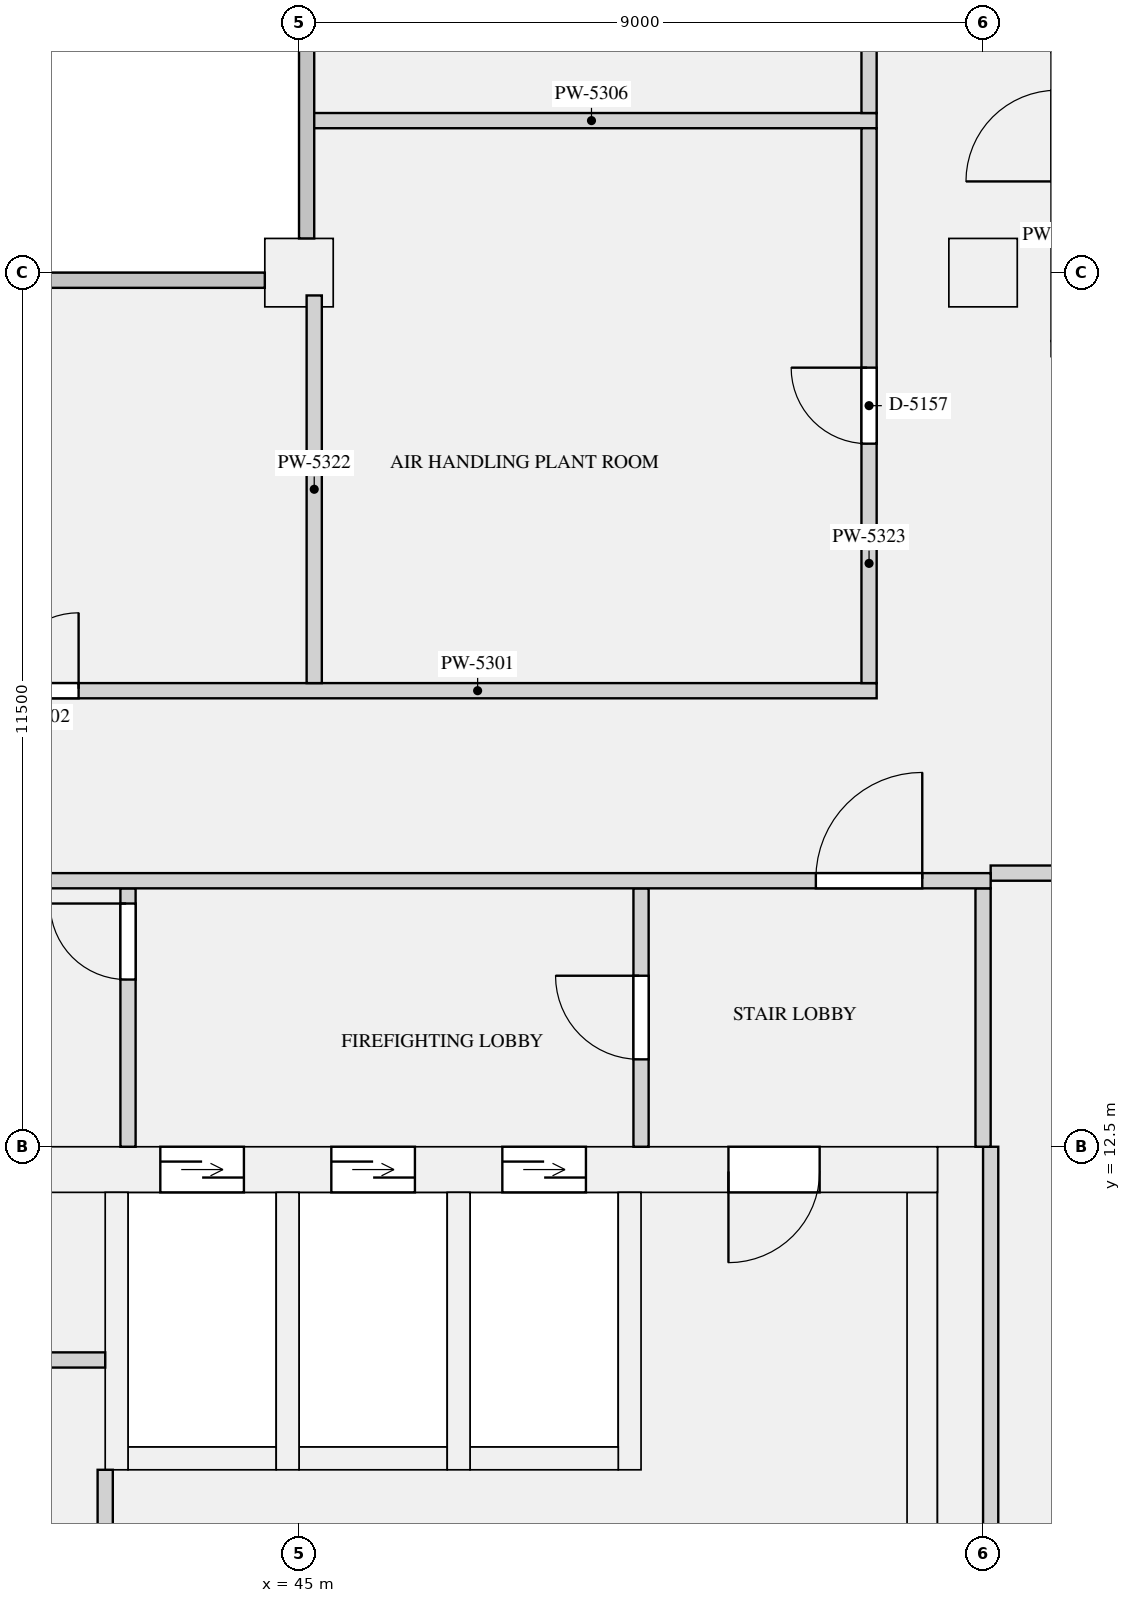
"""IFC4 building model, lengths in metres.
Left out: names, types, materials, properties, quantities, classifications, styles, units other than length and angle.
Written with IfcOpenShell. Run it as: python <this file> out.ifc"""

import sys

from ifc_helpers import new_model, si_unit, direction, frame, frame_2d, origin, origin_2d, place, context, subcontext, project, spatial, rectangle, extrude, element, fill, save


model = new_model("IFC4")
c1 = context("Model", 3, precision=1e-05, world=origin(), true_north=direction((0.0, 1.0)))
c2 = subcontext(c1, "Body", "Model", "MODEL_VIEW")
j1 = project(units=[si_unit("LENGTHUNIT", "METRE"), si_unit("PLANEANGLEUNIT", "RADIAN")], contexts=[c1])
p1 = place(None, origin())
s1 = spatial("IfcSite", under=j1, at=p1, CompositionType="ELEMENT")
p2 = place(p1, origin())
s2 = spatial("IfcBuilding", under=s1, at=p2, CompositionType="ELEMENT")
p3 = place(p2, frame((0.0, 0.0, 240.0)))
s3 = spatial("IfcBuildingStorey", under=s2, at=p3, CompositionType="ELEMENT", Elevation=240.0)
for number, where, z_axis, x_axis in (
    (1, (45.0, 24.0, 0.0), (0.0, 0.0, 1.0), (1.0, 0.0, 0.0)),
    (2, (54.0, 24.0, 0.0), (0.0, 0.0, 1.0), (1.0, 0.0, 0.0)),
):
    element("IfcColumn", number, at=place(p3, frame(where, z_axis=z_axis, x_axis=x_axis)), inside=s3, PredefinedType="COLUMN", context=c2, shape_type="SweptSolid", body=[
        extrude(rectangle(XDim=0.9, YDim=0.9, at=origin_2d()), origin(), (0.0, 0.0, 1.0), 4.2),
    ])
p4 = place(p3, frame((53.7, 0.0, 0.0), z_axis=(0.0, 0.0, 1.0), x_axis=(0.0, 1.0, 0.0)))
e3 = element("IfcWall", 3, at=p4, inside=s3, PredefinedType="SHEAR", context=c2, shape_type="SweptSolid", body=[
    extrude(rectangle(XDim=12.5, YDim=0.6, at=frame_2d((6.25, 0.0))), origin(), (0.0, 0.0, 1.0), 4.2),
])
p5 = place(p3, frame((18.6, 12.2, 0.0), z_axis=(0.0, 0.0, 1.0), x_axis=(1.0, 0.0, 0.0)))
e4 = element("IfcWall", 4, at=p5, inside=s3, PredefinedType="SHEAR", context=c2, shape_type="SweptSolid", body=[
    extrude(rectangle(XDim=34.8, YDim=0.6, at=frame_2d((17.4, 0.0))), origin(), (0.0, 0.0, 1.0), 4.2),
])
p6 = place(p5, frame((24.575, 0.0, 0.0)))
e5 = element("IfcOpeningElement", 5, at=p6, cuts=e4, PredefinedType="OPENING", context=c2, shape_type="SweptSolid", body=[
    extrude(rectangle(XDim=1.1, YDim=2.1, at=frame_2d((0.55, 1.05))), frame((0.0, 0.31, 0.0), z_axis=(0.0, -1.0, 0.0), x_axis=(1.0, 0.0, 0.0)), (0.0, 0.0, 1.0), 0.62),
])
p7 = place(p5, frame((26.825, 0.0, 0.0)))
e6 = element("IfcOpeningElement", 6, at=p7, cuts=e4, PredefinedType="OPENING", context=c2, shape_type="SweptSolid", body=[
    extrude(rectangle(XDim=1.1, YDim=2.1, at=frame_2d((0.55, 1.05))), frame((0.0, 0.31, 0.0), z_axis=(0.0, -1.0, 0.0), x_axis=(1.0, 0.0, 0.0)), (0.0, 0.0, 1.0), 0.62),
])
p8 = place(p5, frame((29.075, 0.0, 0.0)))
e7 = element("IfcOpeningElement", 7, at=p8, cuts=e4, PredefinedType="OPENING", context=c2, shape_type="SweptSolid", body=[
    extrude(rectangle(XDim=1.1, YDim=2.1, at=frame_2d((0.55, 1.05))), frame((0.0, 0.31, 0.0), z_axis=(0.0, -1.0, 0.0), x_axis=(1.0, 0.0, 0.0)), (0.0, 0.0, 1.0), 0.62),
])
p9 = place(p5, frame((18.6, 0.0, 0.0)))
e8 = element("IfcOpeningElement", 8, at=p9, cuts=e4, PredefinedType="OPENING", context=c2, shape_type="SweptSolid", body=[
    extrude(rectangle(XDim=0.9, YDim=2.1, at=frame_2d((0.45, 1.05))), frame((0.0, 0.31, 0.0), z_axis=(0.0, -1.0, 0.0), x_axis=(1.0, 0.0, 0.0)), (0.0, 0.0, 1.0), 0.62),
])
p10 = place(p5, frame((4.65, 0.0, 0.0)))
e9 = element("IfcOpeningElement", 9, at=p10, cuts=e4, PredefinedType="OPENING", context=c2, shape_type="SweptSolid", body=[
    extrude(rectangle(XDim=0.9, YDim=2.1, at=frame_2d((0.45, 1.05))), frame((0.0, 0.31, 0.0), z_axis=(0.0, -1.0, 0.0), x_axis=(1.0, 0.0, 0.0)), (0.0, 0.0, 1.0), 0.62),
])
p11 = place(p5, frame((1.55, 0.0, 0.0)))
e10 = element("IfcOpeningElement", 10, at=p11, cuts=e4, PredefinedType="OPENING", context=c2, shape_type="SweptSolid", body=[
    extrude(rectangle(XDim=1.2, YDim=2.1, at=frame_2d((0.6, 1.05))), frame((0.0, 0.31, 0.0), z_axis=(0.0, -1.0, 0.0), x_axis=(1.0, 0.0, 0.0)), (0.0, 0.0, 1.0), 0.62),
])
p12 = place(p5, frame((32.05, 0.0, 0.0)))
e11 = element("IfcOpeningElement", 11, at=p12, cuts=e4, PredefinedType="OPENING", context=c2, shape_type="SweptSolid", body=[
    extrude(rectangle(XDim=1.2, YDim=2.1, at=frame_2d((0.6, 1.05))), frame((0.0, 0.31, 0.0), z_axis=(0.0, -1.0, 0.0), x_axis=(1.0, 0.0, 0.0)), (0.0, 0.0, 1.0), 0.62),
])
p13 = place(p3, frame((53.2, 1.0, 0.0), z_axis=(0.0, 0.0, 1.0), x_axis=(0.0, 1.0, 0.0)))
e12 = element("IfcWall", 12, at=p13, inside=s3, PredefinedType="SHEAR", context=c2, shape_type="SweptSolid", body=[
    extrude(rectangle(XDim=10.9, YDim=0.4, at=frame_2d((5.45, 0.0))), origin(), (0.0, 0.0, 1.0), 4.2),
])
p14 = place(p3, frame((42.75, 8.4, 0.0), z_axis=(0.0, 0.0, 1.0), x_axis=(1.0, 0.0, 0.0)))
e13 = element("IfcWall", 13, at=p14, inside=s3, PredefinedType="SHEAR", context=c2, shape_type="SweptSolid", body=[
    extrude(rectangle(XDim=1.95, YDim=0.3, at=frame_2d((0.975, 0.0))), origin(), (0.0, 0.0, 1.0), 4.2),
])
p15 = place(p3, frame((42.6, 8.25, 0.0), z_axis=(0.0, 0.0, 1.0), x_axis=(0.0, 1.0, 0.0)))
e14 = element("IfcWall", 14, at=p15, inside=s3, PredefinedType="SHEAR", context=c2, shape_type="SweptSolid", body=[
    extrude(rectangle(XDim=3.65, YDim=0.3, at=frame_2d((1.825, 0.0))), origin(), (0.0, 0.0, 1.0), 4.2),
])
p16 = place(p3, frame((45.0, 8.4, 0.0), z_axis=(0.0, 0.0, 1.0), x_axis=(1.0, 0.0, 0.0)))
e15 = element("IfcWall", 15, at=p16, inside=s3, PredefinedType="SHEAR", context=c2, shape_type="SweptSolid", body=[
    extrude(rectangle(XDim=1.95, YDim=0.3, at=frame_2d((0.975, 0.0))), origin(), (0.0, 0.0, 1.0), 4.2),
])
p17 = place(p3, frame((44.85, 8.25, 0.0), z_axis=(0.0, 0.0, 1.0), x_axis=(0.0, 1.0, 0.0)))
e16 = element("IfcWall", 16, at=p17, inside=s3, PredefinedType="SHEAR", context=c2, shape_type="SweptSolid", body=[
    extrude(rectangle(XDim=3.65, YDim=0.3, at=frame_2d((1.825, 0.0))), origin(), (0.0, 0.0, 1.0), 4.2),
])
p18 = place(p3, frame((47.25, 8.4, 0.0), z_axis=(0.0, 0.0, 1.0), x_axis=(1.0, 0.0, 0.0)))
e17 = element("IfcWall", 17, at=p18, inside=s3, PredefinedType="SHEAR", context=c2, shape_type="SweptSolid", body=[
    extrude(rectangle(XDim=1.95, YDim=0.3, at=frame_2d((0.975, 0.0))), origin(), (0.0, 0.0, 1.0), 4.2),
])
for number, where, z_axis, x_axis in (
    (18, (47.1, 8.25, 0.0), (0.0, 0.0, 1.0), (0.0, 1.0, 0.0)),
    (19, (49.35, 8.25, 0.0), (0.0, 0.0, 1.0), (0.0, 1.0, 0.0)),
):
    element("IfcWall", number, at=place(p3, frame(where, z_axis=z_axis, x_axis=x_axis)), inside=s3, PredefinedType="SHEAR", context=c2, shape_type="SweptSolid", body=[
        extrude(rectangle(XDim=3.65, YDim=0.3, at=frame_2d((1.825, 0.0))), origin(), (0.0, 0.0, 1.0), 4.2),
    ])
p19 = place(p3, frame((36.65, 9.695, 0.0), z_axis=(0.0, 0.0, 1.0), x_axis=(1.0, 0.0, 0.0)))
e20 = element("IfcWall", 20, at=p19, inside=s3, PredefinedType="PARTITIONING", context=c2, shape_type="SweptSolid", body=[
    extrude(rectangle(XDim=5.8, YDim=0.2, at=frame_2d((2.9, 0.0))), origin(), (0.0, 0.0, 1.0), 3.85),
])
p20 = place(p3, frame((42.45, 6.65, 0.0), z_axis=(0.0, 0.0, 1.0), x_axis=(0.0, 1.0, 0.0)))
e21 = element("IfcWall", 21, at=p20, inside=s3, PredefinedType="PARTITIONING", context=c2, shape_type="SweptSolid", body=[
    extrude(rectangle(XDim=1.6, YDim=0.2, at=frame_2d((0.8, 0.0))), origin(), (0.0, 0.0, 1.0), 3.85),
])
p21 = place(p3, frame((42.75, 12.5, 0.0), z_axis=(0.0, 0.0, 1.0), x_axis=(0.0, 1.0, 0.0)))
e22 = element("IfcWall", 22, at=p21, inside=s3, PredefinedType="PARTITIONING", context=c2, shape_type="SweptSolid", body=[
    extrude(rectangle(XDim=3.4, YDim=0.2, at=frame_2d((1.7, 0.0))), origin(), (0.0, 0.0, 1.0), 3.85),
])
p22 = place(p21, frame((2.2, 0.0, 0.0)))
e23 = element("IfcOpeningElement", 23, at=p22, cuts=e22, PredefinedType="OPENING", context=c2, shape_type="SweptSolid", body=[
    extrude(rectangle(XDim=1.0, YDim=2.1, at=frame_2d((0.5, 1.05))), frame((0.0, 0.11, 0.0), z_axis=(0.0, -1.0, 0.0), x_axis=(1.0, 0.0, 0.0)), (0.0, 0.0, 1.0), 0.22),
])
p23 = place(p3, frame((49.5, 12.5, 0.0), z_axis=(0.0, 0.0, 1.0), x_axis=(0.0, 1.0, 0.0)))
e24 = element("IfcWall", 24, at=p23, inside=s3, PredefinedType="PARTITIONING", context=c2, shape_type="SweptSolid", body=[
    extrude(rectangle(XDim=3.4, YDim=0.2, at=frame_2d((1.7, 0.0))), origin(), (0.0, 0.0, 1.0), 3.85),
])
p24 = place(p23, frame((1.15, 0.0, 0.0)))
e25 = element("IfcOpeningElement", 25, at=p24, cuts=e24, PredefinedType="OPENING", context=c2, shape_type="SweptSolid", body=[
    extrude(rectangle(XDim=1.1, YDim=2.1, at=frame_2d((0.55, 1.05))), frame((0.0, 0.11, 0.0), z_axis=(0.0, -1.0, 0.0), x_axis=(1.0, 0.0, 0.0)), (0.0, 0.0, 1.0), 0.22),
])
p25 = place(p3, frame((54.0, 12.5, 0.0), z_axis=(0.0, 0.0, 1.0), x_axis=(0.0, 1.0, 0.0)))
e26 = element("IfcWall", 26, at=p25, inside=s3, PredefinedType="PARTITIONING", context=c2, shape_type="SweptSolid", body=[
    extrude(rectangle(XDim=3.4, YDim=0.2, at=frame_2d((1.7, 0.0))), origin(), (0.0, 0.0, 1.0), 3.85),
])
p26 = place(p3, frame((17.9, 16.0, 0.0), z_axis=(0.0, 0.0, 1.0), x_axis=(1.0, 0.0, 0.0)))
e27 = element("IfcWall", 27, at=p26, inside=s3, PredefinedType="PARTITIONING", context=c2, shape_type="SweptSolid", body=[
    extrude(rectangle(XDim=36.2, YDim=0.2, at=frame_2d((18.1, 0.0))), origin(), (0.0, 0.0, 1.0), 3.85),
])
p27 = place(p26, frame((0.9, 0.0, 0.0)))
e28 = element("IfcOpeningElement", 28, at=p27, cuts=e27, PredefinedType="OPENING", context=c2, shape_type="SweptSolid", body=[
    extrude(rectangle(XDim=1.4, YDim=2.1, at=frame_2d((0.7, 1.05))), frame((0.0, 0.11, 0.0), z_axis=(0.0, -1.0, 0.0), x_axis=(1.0, 0.0, 0.0)), (0.0, 0.0, 1.0), 0.22),
])
p28 = place(p26, frame((33.9, 0.0, 0.0)))
e29 = element("IfcOpeningElement", 29, at=p28, cuts=e27, PredefinedType="OPENING", context=c2, shape_type="SweptSolid", body=[
    extrude(rectangle(XDim=1.4, YDim=2.1, at=frame_2d((0.7, 1.05))), frame((0.0, 0.11, 0.0), z_axis=(0.0, -1.0, 0.0), x_axis=(1.0, 0.0, 0.0)), (0.0, 0.0, 1.0), 0.22),
])
p29 = place(p3, frame((54.1, 16.1, 0.0), z_axis=(0.0, 0.0, 1.0), x_axis=(1.0, 0.0, 0.0)))
e30 = element("IfcWall", 30, at=p29, inside=s3, PredefinedType="PARTITIONING", context=c2, shape_type="SweptSolid", body=[
    extrude(rectangle(XDim=14.75, YDim=0.2, at=frame_2d((7.375, 0.0))), origin(), (0.0, 0.0, 1.0), 3.85),
])
p30 = place(p29, frame((1.55, 0.0, 0.0)))
e31 = element("IfcOpeningElement", 31, at=p30, cuts=e30, PredefinedType="OPENING", context=c2, shape_type="SweptSolid", body=[
    extrude(rectangle(XDim=1.8, YDim=2.1, at=frame_2d((0.9, 1.05))), frame((0.0, 0.11, 0.0), z_axis=(0.0, -1.0, 0.0), x_axis=(1.0, 0.0, 0.0)), (0.0, 0.0, 1.0), 0.22),
])
p31 = place(p29, frame((7.75, 0.0, 0.0)))
e32 = element("IfcOpeningElement", 32, at=p31, cuts=e30, PredefinedType="OPENING", context=c2, shape_type="SweptSolid", body=[
    extrude(rectangle(XDim=1.8, YDim=2.1, at=frame_2d((0.9, 1.05))), frame((0.0, 0.11, 0.0), z_axis=(0.0, -1.0, 0.0), x_axis=(1.0, 0.0, 0.0)), (0.0, 0.0, 1.0), 0.22),
])
p32 = place(p29, frame((13.075, 0.0, 0.0)))
e33 = element("IfcOpeningElement", 33, at=p32, cuts=e30, PredefinedType="OPENING", context=c2, shape_type="SweptSolid", body=[
    extrude(rectangle(XDim=1.0, YDim=2.1, at=frame_2d((0.5, 1.05))), frame((0.0, 0.11, 0.0), z_axis=(0.0, -1.0, 0.0), x_axis=(1.0, 0.0, 0.0)), (0.0, 0.0, 1.0), 0.22),
])
p33 = place(p3, frame((26.7, 18.5, 0.0), z_axis=(0.0, 0.0, 1.0), x_axis=(1.0, 0.0, 0.0)))
e34 = element("IfcWall", 34, at=p33, inside=s3, PredefinedType="PARTITIONING", context=c2, shape_type="SweptSolid", body=[
    extrude(rectangle(XDim=25.9, YDim=0.2, at=frame_2d((12.95, 0.0))), origin(), (0.0, 0.0, 1.0), 3.85),
])
p34 = place(p33, frame((5.2, 0.0, 0.0)))
e35 = element("IfcOpeningElement", 35, at=p34, cuts=e34, PredefinedType="OPENING", context=c2, shape_type="SweptSolid", body=[
    extrude(rectangle(XDim=1.0, YDim=2.1, at=frame_2d((0.5, 1.05))), frame((0.0, 0.11, 0.0), z_axis=(0.0, -1.0, 0.0), x_axis=(1.0, 0.0, 0.0)), (0.0, 0.0, 1.0), 0.22),
])
p35 = place(p33, frame((14.4, 0.0, 0.0)))
e36 = element("IfcOpeningElement", 36, at=p35, cuts=e34, PredefinedType="OPENING", context=c2, shape_type="SweptSolid", body=[
    extrude(rectangle(XDim=1.0, YDim=2.1, at=frame_2d((0.5, 1.05))), frame((0.0, 0.11, 0.0), z_axis=(0.0, -1.0, 0.0), x_axis=(1.0, 0.0, 0.0)), (0.0, 0.0, 1.0), 0.22),
])
p36 = place(p3, frame((45.096, 26.0, 0.0), z_axis=(0.0, 0.0, 1.0), x_axis=(1.0, 0.0, 0.0)))
e37 = element("IfcWall", 37, at=p36, inside=s3, PredefinedType="PARTITIONING", context=c2, shape_type="SweptSolid", body=[
    extrude(rectangle(XDim=7.504, YDim=0.2, at=frame_2d((3.752, 0.0))), origin(), (0.0, 0.0, 1.0), 3.85),
])
p37 = place(p3, frame((54.1, 0.65, 0.0), z_axis=(0.0, 0.0, 1.0), x_axis=(0.0, 1.0, 0.0)))
e38 = element("IfcWall", 38, at=p37, inside=s3, PredefinedType="PARTITIONING", context=c2, shape_type="SweptSolid", body=[
    extrude(rectangle(XDim=11.85, YDim=0.2, at=frame_2d((5.925, 0.0))), origin(), (0.0, 0.0, 1.0), 3.85),
])
p38 = place(p3, frame((45.2, 18.6, 0.0), z_axis=(0.0, 0.0, 1.0), x_axis=(0.0, 1.0, 0.0)))
e39 = element("IfcWall", 39, at=p38, inside=s3, PredefinedType="PARTITIONING", context=c2, shape_type="SweptSolid", body=[
    extrude(rectangle(XDim=5.1, YDim=0.2, at=frame_2d((2.55, 0.0))), origin(), (0.0, 0.0, 1.0), 3.85),
])
p39 = place(p3, frame((52.5, 18.6, 0.0), z_axis=(0.0, 0.0, 1.0), x_axis=(0.0, 1.0, 0.0)))
e40 = element("IfcWall", 40, at=p39, inside=s3, PredefinedType="PARTITIONING", context=c2, shape_type="SweptSolid", body=[
    extrude(rectangle(XDim=7.3, YDim=0.2, at=frame_2d((3.65, 0.0))), origin(), (0.0, 0.0, 1.0), 3.85),
])
p40 = place(p39, frame((3.15, 0.0, 0.0)))
e41 = element("IfcOpeningElement", 41, at=p40, cuts=e40, PredefinedType="OPENING", context=c2, shape_type="SweptSolid", body=[
    extrude(rectangle(XDim=1.0, YDim=2.1, at=frame_2d((0.5, 1.05))), frame((0.0, 0.11, 0.0), z_axis=(0.0, -1.0, 0.0), x_axis=(1.0, 0.0, 0.0)), (0.0, 0.0, 1.0), 0.22),
])
p41 = place(p3, frame((52.5, 26.1, 0.0), z_axis=(0.0, 0.0, 1.0), x_axis=(0.0, 1.0, 0.0)))
e42 = element("IfcWall", 42, at=p41, inside=s3, PredefinedType="PARTITIONING", context=c2, shape_type="SweptSolid", body=[
    extrude(rectangle(XDim=4.8, YDim=0.2, at=frame_2d((2.4, 0.0))), origin(), (0.0, 0.0, 1.0), 3.85),
])
p42 = place(p41, frame((1.9, 0.0, 0.0)))
e43 = element("IfcOpeningElement", 43, at=p42, cuts=e42, PredefinedType="OPENING", context=c2, shape_type="SweptSolid", body=[
    extrude(rectangle(XDim=1.0, YDim=2.1, at=frame_2d((0.5, 1.05))), frame((0.0, 0.11, 0.0), z_axis=(0.0, -1.0, 0.0), x_axis=(1.0, 0.0, 0.0)), (0.0, 0.0, 1.0), 0.22),
])
p43 = place(p6, origin())
e44 = element("IfcDoor", 44, at=p43, inside=s3, OperationType="DOUBLE_DOOR_SLIDING", PredefinedType="DOOR", context=c2, shape_type="SweptSolid", body=[
    extrude(rectangle(XDim=1.1, YDim=2.1, at=frame_2d((0.55, 1.05))), frame((0.0, 0.025, 0.0), z_axis=(0.0, -1.0, 0.0), x_axis=(1.0, 0.0, 0.0)), (0.0, 0.0, 1.0), 0.05),
])
fill(e5, e44)
p44 = place(p7, origin())
e45 = element("IfcDoor", 45, at=p44, inside=s3, OperationType="DOUBLE_DOOR_SLIDING", PredefinedType="DOOR", context=c2, shape_type="SweptSolid", body=[
    extrude(rectangle(XDim=1.1, YDim=2.1, at=frame_2d((0.55, 1.05))), frame((0.0, 0.025, 0.0), z_axis=(0.0, -1.0, 0.0), x_axis=(1.0, 0.0, 0.0)), (0.0, 0.0, 1.0), 0.05),
])
fill(e6, e45)
p45 = place(p8, origin())
e46 = element("IfcDoor", 46, at=p45, inside=s3, OperationType="DOUBLE_DOOR_SLIDING", PredefinedType="DOOR", context=c2, shape_type="SweptSolid", body=[
    extrude(rectangle(XDim=1.1, YDim=2.1, at=frame_2d((0.55, 1.05))), frame((0.0, 0.025, 0.0), z_axis=(0.0, -1.0, 0.0), x_axis=(1.0, 0.0, 0.0)), (0.0, 0.0, 1.0), 0.05),
])
fill(e7, e46)
p46 = place(p12, frame((1.2, 0.0, 0.0), z_axis=(0.0, 0.0, 1.0), x_axis=(-1.0, 0.0, 0.0)))
e47 = element("IfcDoor", 47, at=p46, inside=s3, OperationType="SINGLE_SWING_RIGHT", PredefinedType="DOOR", context=c2, shape_type="SweptSolid", body=[
    extrude(rectangle(XDim=1.2, YDim=2.1, at=frame_2d((0.6, 1.05))), frame((0.0, 0.025, 0.0), z_axis=(0.0, -1.0, 0.0), x_axis=(1.0, 0.0, 0.0)), (0.0, 0.0, 1.0), 0.05),
])
fill(e11, e47)
p47 = place(p22, origin())
e48 = element("IfcDoor", 48, at=p47, inside=s3, OperationType="SINGLE_SWING_RIGHT", PredefinedType="DOOR", context=c2, shape_type="SweptSolid", body=[
    extrude(rectangle(XDim=1.0, YDim=2.1, at=frame_2d((0.5, 1.05))), frame((0.0, 0.025, 0.0), z_axis=(0.0, -1.0, 0.0), x_axis=(1.0, 0.0, 0.0)), (0.0, 0.0, 1.0), 0.05),
])
fill(e23, e48)
p48 = place(p24, origin())
e49 = element("IfcDoor", 49, at=p48, inside=s3, OperationType="SINGLE_SWING_RIGHT", PredefinedType="DOOR", context=c2, shape_type="SweptSolid", body=[
    extrude(rectangle(XDim=1.1, YDim=2.1, at=frame_2d((0.55, 1.05))), frame((0.0, 0.025, 0.0), z_axis=(0.0, -1.0, 0.0), x_axis=(1.0, 0.0, 0.0)), (0.0, 0.0, 1.0), 0.05),
])
fill(e25, e49)
p49 = place(p28, origin())
e50 = element("IfcDoor", 50, at=p49, inside=s3, OperationType="SINGLE_SWING_RIGHT", PredefinedType="DOOR", context=c2, shape_type="SweptSolid", body=[
    extrude(rectangle(XDim=1.4, YDim=2.1, at=frame_2d((0.7, 1.05))), frame((0.0, 0.025, 0.0), z_axis=(0.0, -1.0, 0.0), x_axis=(1.0, 0.0, 0.0)), (0.0, 0.0, 1.0), 0.05),
])
fill(e29, e50)
p50 = place(p40, origin())
e51 = element("IfcDoor", 51, at=p50, inside=s3, OperationType="SINGLE_SWING_RIGHT", PredefinedType="DOOR", context=c2, shape_type="SweptSolid", body=[
    extrude(rectangle(XDim=1.0, YDim=2.1, at=frame_2d((0.5, 1.05))), frame((0.0, 0.025, 0.0), z_axis=(0.0, -1.0, 0.0), x_axis=(1.0, 0.0, 0.0)), (0.0, 0.0, 1.0), 0.05),
])
fill(e41, e51)
p51 = place(p35, origin())
e52 = element("IfcDoor", 52, at=p51, inside=s3, OperationType="SINGLE_SWING_RIGHT", PredefinedType="DOOR", context=c2, shape_type="SweptSolid", body=[
    extrude(rectangle(XDim=1.0, YDim=2.1, at=frame_2d((0.5, 1.05))), frame((0.0, 0.025, 0.0), z_axis=(0.0, -1.0, 0.0), x_axis=(1.0, 0.0, 0.0)), (0.0, 0.0, 1.0), 0.05),
])
fill(e36, e52)
save(model, sys.argv[1])
